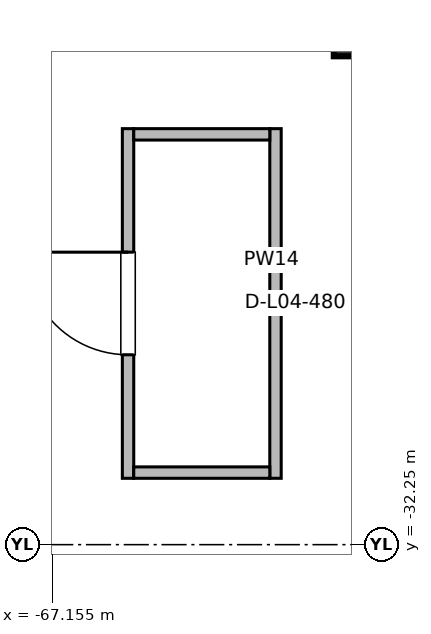
"""IFC4 building model, lengths in metres.
Left out: names, types, materials, properties, quantities, classifications, styles, units other than length and angle.
Written with IfcOpenShell. Run it as: python <this file> out.ifc"""

import sys

from ifc_helpers import new_model, si_unit, direction, frame, frame_2d, origin, origin_2d, place, context, subcontext, project, spatial, rectangle, extrude, element, fill, save


model = new_model("IFC4")
c1 = context("Model", 3, precision=1e-05, world=origin(), true_north=direction((0.0, 1.0)))
c2 = subcontext(c1, "Body", "Model", "MODEL_VIEW")
j1 = project(units=[si_unit("LENGTHUNIT", "METRE"), si_unit("PLANEANGLEUNIT", "RADIAN")], contexts=[c1])
p1 = place(None, origin())
s1 = spatial("IfcSite", under=j1, at=p1, CompositionType="ELEMENT")
p2 = place(p1, origin())
s2 = spatial("IfcBuilding", under=s1, at=p2, CompositionType="ELEMENT")
p3 = place(p2, frame((0.0, 0.0, 16.2)))
s3 = spatial("IfcBuildingStorey", under=s2, at=p3, CompositionType="ELEMENT", Elevation=16.2)
p4 = place(p3, frame((-63.0, -25.375, 0.0), z_axis=(0.0, 0.0, 1.0), x_axis=(1.0, 0.0, 0.0)))
e1 = element("IfcColumn", 1, at=p4, inside=s3, PredefinedType="COLUMN", context=c2, shape_type="SweptSolid", body=[
    extrude(rectangle(XDim=0.9, YDim=0.9, at=origin_2d()), origin(), (0.0, 0.0, 1.0), 4.8),
])
p5 = place(p3, frame((-66.157, -31.377, 0.0), z_axis=(0.0, 0.0, 1.0), x_axis=(0.0, 1.0, 0.0)))
e2 = element("IfcWall", 2, at=p5, inside=s3, PredefinedType="PARTITIONING", context=c2, shape_type="SweptSolid", body=[
    extrude(rectangle(XDim=4.6, YDim=0.15, at=frame_2d((2.3, 0.0))), origin(), (0.0, 0.0, 1.0), 3.82),
])
p6 = place(p5, frame((1.625, 0.0, 0.0)))
e3 = element("IfcOpeningElement", 3, at=p6, cuts=e2, PredefinedType="OPENING", context=c2, shape_type="SweptSolid", body=[
    extrude(rectangle(XDim=1.35, YDim=2.2, at=frame_2d((0.675, 1.1))), frame((0.0, 0.085, 0.0), z_axis=(0.0, -1.0, 0.0), x_axis=(1.0, 0.0, 0.0)), (0.0, 0.0, 1.0), 0.17),
])
p7 = place(p3, frame((-64.217, -31.377, 0.0), z_axis=(0.0, 0.0, 1.0), x_axis=(0.0, 1.0, 0.0)))
e4 = element("IfcWall", 4, at=p7, inside=s3, PredefinedType="PARTITIONING", context=c2, shape_type="SweptSolid", body=[
    extrude(rectangle(XDim=4.6, YDim=0.15, at=frame_2d((2.3, 0.0))), origin(), (0.0, 0.0, 1.0), 3.82),
])
for number, where, z_axis, x_axis in (
    (5, (-66.082, -31.302, 0.0), (0.0, 0.0, 1.0), (1.0, 0.0, 0.0)),
    (6, (-66.082, -26.852, 0.0), (0.0, 0.0, 1.0), (1.0, 0.0, 0.0)),
):
    element("IfcWall", number, at=place(p3, frame(where, z_axis=z_axis, x_axis=x_axis)), inside=s3, PredefinedType="PARTITIONING", context=c2, shape_type="SweptSolid", body=[
        extrude(rectangle(XDim=1.79, YDim=0.15, at=frame_2d((0.895, 0.0))), origin(), (0.0, 0.0, 1.0), 3.82),
    ])
p8 = place(p6, origin())
e7 = element("IfcDoor", 7, at=p8, inside=s3, OperationType="SINGLE_SWING_RIGHT", PredefinedType="DOOR", context=c2, shape_type="SweptSolid", body=[
    extrude(rectangle(XDim=1.35, YDim=2.2, at=frame_2d((0.675, 1.1))), frame((0.0, 0.025, 0.0), z_axis=(0.0, -1.0, 0.0), x_axis=(1.0, 0.0, 0.0)), (0.0, 0.0, 1.0), 0.05),
])
fill(e3, e7)
save(model, sys.argv[1])
